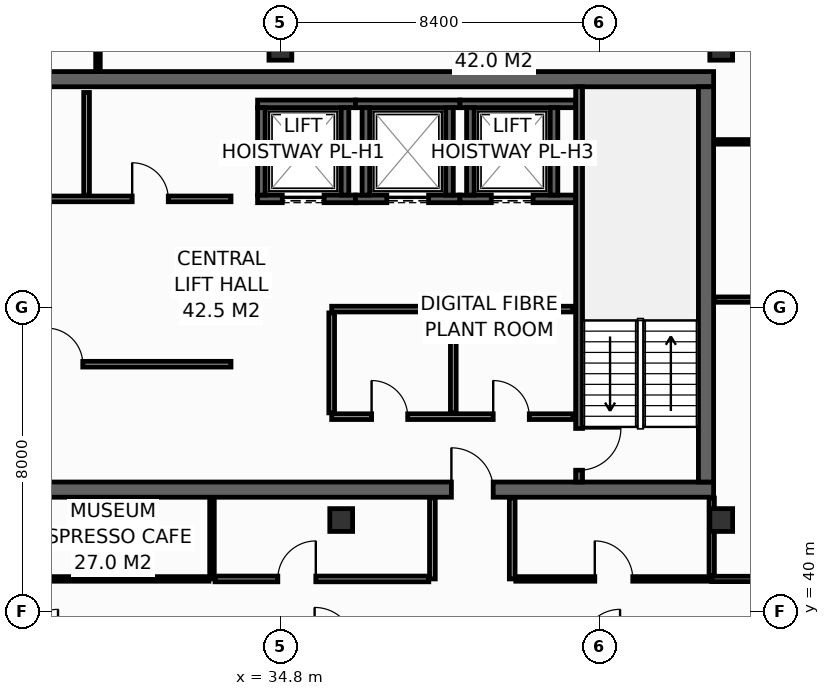
"""IFC4 building model, lengths in metres.
Left out: names, types, materials, properties, quantities, classifications, styles, units other than length and angle.
Written with IfcOpenShell. Run it as: python <this file> out.ifc"""

import sys

from ifc_helpers import new_model, si_unit, direction, frame, frame_2d, origin, origin_2d, place, context, subcontext, project, spatial, rectangle, hollow_rectangle, extrude, element, fill, save


model = new_model("IFC4")
c1 = context("Model", 3, precision=1e-05, world=origin(), true_north=direction((0.0, 1.0)))
c2 = subcontext(c1, "Body", "Model", "MODEL_VIEW")
j1 = project(units=[si_unit("LENGTHUNIT", "METRE"), si_unit("PLANEANGLEUNIT", "RADIAN")], contexts=[c1])
p1 = place(None, origin())
s1 = spatial("IfcSite", under=j1, at=p1, CompositionType="ELEMENT")
p2 = place(p1, origin())
s2 = spatial("IfcBuilding", under=s1, at=p2, CompositionType="ELEMENT")
p3 = place(p2, frame((0.0, 0.0, 261.0)))
s3 = spatial("IfcBuildingStorey", under=s2, at=p3, CompositionType="ELEMENT", Elevation=261.0)
p4 = place(p3, frame((13.7, 43.2, 0.0), z_axis=(0.0, 0.0, 1.0), x_axis=(1.0, 0.0, 0.0)))
e1 = element("IfcWall", 1, at=p4, inside=s3, PredefinedType="SHEAR", context=c2, shape_type="SweptSolid", body=[
    extrude(rectangle(XDim=32.5, YDim=0.4, at=frame_2d((16.25, 0.0))), origin(), (0.0, 0.0, 1.0), 3.55),
])
p5 = place(p4, frame((5.4, 0.0, 0.0)))
e2 = element("IfcOpeningElement", 2, at=p5, cuts=e1, PredefinedType="OPENING", context=c2, shape_type="SweptSolid", body=[
    extrude(rectangle(XDim=1.1, YDim=2.15, at=frame_2d((0.55, 1.075))), frame((0.0, 0.21, 0.0), z_axis=(0.0, -1.0, 0.0), x_axis=(1.0, 0.0, 0.0)), (0.0, 0.0, 1.0), 0.42),
])
p6 = place(p4, frame((25.6, 0.0, 0.0)))
e3 = element("IfcOpeningElement", 3, at=p6, cuts=e1, PredefinedType="OPENING", context=c2, shape_type="SweptSolid", body=[
    extrude(rectangle(XDim=1.1, YDim=2.15, at=frame_2d((0.55, 1.075))), frame((0.0, 0.21, 0.0), z_axis=(0.0, -1.0, 0.0), x_axis=(1.0, 0.0, 0.0)), (0.0, 0.0, 1.0), 0.42),
])
p7 = place(p3, frame((13.7, 54.0, 0.0), z_axis=(0.0, 0.0, 1.0), x_axis=(1.0, 0.0, 0.0)))
e4 = element("IfcWall", 4, at=p7, inside=s3, PredefinedType="SHEAR", context=c2, shape_type="SweptSolid", body=[
    extrude(rectangle(XDim=32.5, YDim=0.4, at=frame_2d((16.25, 0.0))), origin(), (0.0, 0.0, 1.0), 3.55),
])
p8 = place(p3, frame((46.0, 43.4, 0.0), z_axis=(0.0, 0.0, 1.0), x_axis=(0.0, 1.0, 0.0)))
e5 = element("IfcWall", 5, at=p8, inside=s3, PredefinedType="SHEAR", context=c2, shape_type="SweptSolid", body=[
    extrude(rectangle(XDim=10.4, YDim=0.4, at=frame_2d((5.2, 0.0))), origin(), (0.0, 0.0, 1.0), 3.55),
])
for number, where, z_axis, x_axis in (
    (6, (34.8, 54.8, 0.0), (0.0, 0.0, 1.0), (1.0, 0.0, 0.0)),
    (7, (46.4, 54.8, 0.0), (0.0, 0.0, 1.0), (1.0, 0.0, 0.0)),
    (8, (36.4, 42.4, 0.0), (0.0, 0.0, 1.0), (1.0, 0.0, 0.0)),
    (9, (46.4, 42.4, 0.0), (0.0, 0.0, 1.0), (1.0, 0.0, 0.0)),
):
    element("IfcColumn", number, at=place(p3, frame(where, z_axis=z_axis, x_axis=x_axis)), inside=s3, PredefinedType="COLUMN", context=c2, shape_type="SweptSolid", body=[
        extrude(hollow_rectangle(XDim=0.6, YDim=0.6, WallThickness=0.028, at=origin_2d()), origin(), (0.0, 0.0, 1.0), 3.8),
    ])
p9 = place(p3, frame((34.2, 50.85, 0.0), z_axis=(0.0, 0.0, 1.0), x_axis=(1.0, 0.0, 0.0)))
e10 = element("IfcWall", 10, at=p9, inside=s3, PredefinedType="SHEAR", context=c2, shape_type="SweptSolid", body=[
    extrude(rectangle(XDim=2.575, YDim=0.2, at=frame_2d((1.288, 0.0))), origin(), (0.0, 0.0, 1.0), 3.55),
])
p10 = place(p9, frame((0.65, 0.0, 0.0)))
e11 = element("IfcOpeningElement", 11, at=p10, cuts=e10, PredefinedType="OPENING", context=c2, shape_type="SweptSolid", body=[
    extrude(rectangle(XDim=1.1, YDim=2.2, at=frame_2d((0.55, 1.1))), frame((0.0, 0.11, 0.0), z_axis=(0.0, -1.0, 0.0), x_axis=(1.0, 0.0, 0.0)), (0.0, 0.0, 1.0), 0.22),
])
p11 = place(p3, frame((34.2, 53.35, 0.0), z_axis=(0.0, 0.0, 1.0), x_axis=(1.0, 0.0, 0.0)))
e12 = element("IfcWall", 12, at=p11, inside=s3, PredefinedType="SHEAR", context=c2, shape_type="SweptSolid", body=[
    extrude(rectangle(XDim=2.575, YDim=0.2, at=frame_2d((1.288, 0.0))), origin(), (0.0, 0.0, 1.0), 3.55),
])
for number, where, z_axis, x_axis in (
    (13, (34.3, 50.95, 0.0), (0.0, 0.0, 1.0), (0.0, 1.0, 0.0)),
    (14, (36.5, 50.95, 0.0), (0.0, 0.0, 1.0), (0.0, 1.0, 0.0)),
):
    element("IfcWall", number, at=place(p3, frame(where, z_axis=z_axis, x_axis=x_axis)), inside=s3, PredefinedType="SHEAR", context=c2, shape_type="SweptSolid", body=[
        extrude(rectangle(XDim=2.3, YDim=0.2, at=frame_2d((1.15, 0.0))), origin(), (0.0, 0.0, 1.0), 3.55),
    ])
p12 = place(p3, frame((36.775, 50.85, 0.0), z_axis=(0.0, 0.0, 1.0), x_axis=(1.0, 0.0, 0.0)))
e15 = element("IfcWall", 15, at=p12, inside=s3, PredefinedType="SHEAR", context=c2, shape_type="SweptSolid", body=[
    extrude(rectangle(XDim=2.75, YDim=0.2, at=frame_2d((1.375, 0.0))), origin(), (0.0, 0.0, 1.0), 3.55),
])
p13 = place(p12, frame((0.825, 0.0, 0.0)))
e16 = element("IfcOpeningElement", 16, at=p13, cuts=e15, PredefinedType="OPENING", context=c2, shape_type="SweptSolid", body=[
    extrude(rectangle(XDim=1.1, YDim=2.2, at=frame_2d((0.55, 1.1))), frame((0.0, 0.11, 0.0), z_axis=(0.0, -1.0, 0.0), x_axis=(1.0, 0.0, 0.0)), (0.0, 0.0, 1.0), 0.22),
])
p14 = place(p3, frame((36.775, 53.35, 0.0), z_axis=(0.0, 0.0, 1.0), x_axis=(1.0, 0.0, 0.0)))
e17 = element("IfcWall", 17, at=p14, inside=s3, PredefinedType="SHEAR", context=c2, shape_type="SweptSolid", body=[
    extrude(rectangle(XDim=2.75, YDim=0.2, at=frame_2d((1.375, 0.0))), origin(), (0.0, 0.0, 1.0), 3.55),
])
for number, where, z_axis, x_axis in (
    (18, (37.05, 50.95, 0.0), (0.0, 0.0, 1.0), (0.0, 1.0, 0.0)),
    (19, (39.25, 50.95, 0.0), (0.0, 0.0, 1.0), (0.0, 1.0, 0.0)),
):
    element("IfcWall", number, at=place(p3, frame(where, z_axis=z_axis, x_axis=x_axis)), inside=s3, PredefinedType="SHEAR", context=c2, shape_type="SweptSolid", body=[
        extrude(rectangle(XDim=2.3, YDim=0.2, at=frame_2d((1.15, 0.0))), origin(), (0.0, 0.0, 1.0), 3.55),
    ])
p15 = place(p3, frame((39.525, 50.85, 0.0), z_axis=(0.0, 0.0, 1.0), x_axis=(1.0, 0.0, 0.0)))
e20 = element("IfcWall", 20, at=p15, inside=s3, PredefinedType="SHEAR", context=c2, shape_type="SweptSolid", body=[
    extrude(rectangle(XDim=3.045, YDim=0.2, at=frame_2d((1.522, 0.0))), origin(), (0.0, 0.0, 1.0), 3.55),
])
p16 = place(p15, frame((0.825, 0.0, 0.0)))
e21 = element("IfcOpeningElement", 21, at=p16, cuts=e20, PredefinedType="OPENING", context=c2, shape_type="SweptSolid", body=[
    extrude(rectangle(XDim=1.1, YDim=2.2, at=frame_2d((0.55, 1.1))), frame((0.0, 0.11, 0.0), z_axis=(0.0, -1.0, 0.0), x_axis=(1.0, 0.0, 0.0)), (0.0, 0.0, 1.0), 0.22),
])
p17 = place(p3, frame((39.525, 53.35, 0.0), z_axis=(0.0, 0.0, 1.0), x_axis=(1.0, 0.0, 0.0)))
e22 = element("IfcWall", 22, at=p17, inside=s3, PredefinedType="SHEAR", context=c2, shape_type="SweptSolid", body=[
    extrude(rectangle(XDim=3.045, YDim=0.2, at=frame_2d((1.522, 0.0))), origin(), (0.0, 0.0, 1.0), 3.55),
])
for number, where, z_axis, x_axis in (
    (23, (39.8, 50.95, 0.0), (0.0, 0.0, 1.0), (0.0, 1.0, 0.0)),
    (24, (42.0, 50.95, 0.0), (0.0, 0.0, 1.0), (0.0, 1.0, 0.0)),
):
    element("IfcWall", number, at=place(p3, frame(where, z_axis=z_axis, x_axis=x_axis)), inside=s3, PredefinedType="SHEAR", context=c2, shape_type="SweptSolid", body=[
        extrude(rectangle(XDim=2.3, YDim=0.2, at=frame_2d((1.15, 0.0))), origin(), (0.0, 0.0, 1.0), 3.55),
    ])
p18 = place(p3, frame((42.66, 53.8, 0.0), z_axis=(0.0, 0.0, 1.0), x_axis=(0.0, -1.0, 0.0)))
e25 = element("IfcWall", 25, at=p18, inside=s3, PredefinedType="SHEAR", context=c2, shape_type="SweptSolid", body=[
    extrude(rectangle(XDim=10.4, YDim=0.18, at=frame_2d((5.2, 0.0))), origin(), (0.0, 0.0, 1.0), 3.55),
])
p19 = place(p18, frame((8.99, 0.0, 0.0)))
e26 = element("IfcOpeningElement", 26, at=p19, cuts=e25, PredefinedType="OPENING", context=c2, shape_type="SweptSolid", body=[
    extrude(rectangle(XDim=1.1, YDim=2.15, at=frame_2d((0.55, 1.075))), frame((0.0, 0.1, 0.0), z_axis=(0.0, -1.0, 0.0), x_axis=(1.0, 0.0, 0.0)), (0.0, 0.0, 1.0), 0.2),
])
p20 = place(p3, frame((36.15, 45.12, 0.0), z_axis=(0.0, 0.0, 1.0), x_axis=(1.0, 0.0, 0.0)))
e27 = element("IfcWall", 27, at=p20, inside=s3, PredefinedType="PARTITIONING", context=c2, shape_type="SweptSolid", body=[
    extrude(rectangle(XDim=6.35, YDim=0.15, at=frame_2d((3.175, 0.0))), origin(), (0.0, 0.0, 1.0), 3.55),
])
p21 = place(p20, frame((1.05, 0.0, 0.0)))
e28 = element("IfcOpeningElement", 28, at=p21, cuts=e27, PredefinedType="OPENING", context=c2, shape_type="SweptSolid", body=[
    extrude(rectangle(XDim=0.95, YDim=2.15, at=frame_2d((0.475, 1.075))), frame((0.0, 0.085, 0.0), z_axis=(0.0, -1.0, 0.0), x_axis=(1.0, 0.0, 0.0)), (0.0, 0.0, 1.0), 0.17),
])
p22 = place(p20, frame((4.25, 0.0, 0.0)))
e29 = element("IfcOpeningElement", 29, at=p22, cuts=e27, PredefinedType="OPENING", context=c2, shape_type="SweptSolid", body=[
    extrude(rectangle(XDim=0.95, YDim=2.15, at=frame_2d((0.475, 1.075))), frame((0.0, 0.085, 0.0), z_axis=(0.0, -1.0, 0.0), x_axis=(1.0, 0.0, 0.0)), (0.0, 0.0, 1.0), 0.17),
])
p23 = place(p3, frame((36.15, 47.95, 0.0), z_axis=(0.0, 0.0, 1.0), x_axis=(1.0, 0.0, 0.0)))
e30 = element("IfcWall", 30, at=p23, inside=s3, PredefinedType="PARTITIONING", context=c2, shape_type="SweptSolid", body=[
    extrude(rectangle(XDim=6.35, YDim=0.15, at=frame_2d((3.175, 0.0))), origin(), (0.0, 0.0, 1.0), 3.55),
])
for number, where, z_axis, x_axis in (
    (31, (36.15, 45.22, 0.0), (0.0, 0.0, 1.0), (0.0, 1.0, 0.0)),
    (32, (39.35, 45.22, 0.0), (0.0, 0.0, 1.0), (0.0, 1.0, 0.0)),
):
    element("IfcWall", number, at=place(p3, frame(where, z_axis=z_axis, x_axis=x_axis)), inside=s3, PredefinedType="PARTITIONING", context=c2, shape_type="SweptSolid", body=[
        extrude(rectangle(XDim=2.63, YDim=0.15, at=frame_2d((1.315, 0.0))), origin(), (0.0, 0.0, 1.0), 3.55),
    ])
p24 = place(p3, frame((25.85, 50.85, 0.0), z_axis=(0.0, 0.0, 1.0), x_axis=(1.0, 0.0, 0.0)))
e33 = element("IfcWall", 33, at=p24, inside=s3, PredefinedType="PARTITIONING", context=c2, shape_type="SweptSolid", body=[
    extrude(rectangle(XDim=7.65, YDim=0.15, at=frame_2d((3.825, 0.0))), origin(), (0.0, 0.0, 1.0), 3.55),
])
p25 = place(p24, frame((1.25, 0.0, 0.0)))
e34 = element("IfcOpeningElement", 34, at=p25, cuts=e33, PredefinedType="OPENING", context=c2, shape_type="SweptSolid", body=[
    extrude(rectangle(XDim=0.95, YDim=2.15, at=frame_2d((0.475, 1.075))), frame((0.0, 0.085, 0.0), z_axis=(0.0, -1.0, 0.0), x_axis=(1.0, 0.0, 0.0)), (0.0, 0.0, 1.0), 0.17),
])
p26 = place(p24, frame((5.05, 0.0, 0.0)))
e35 = element("IfcOpeningElement", 35, at=p26, cuts=e33, PredefinedType="OPENING", context=c2, shape_type="SweptSolid", body=[
    extrude(rectangle(XDim=0.95, YDim=2.15, at=frame_2d((0.475, 1.075))), frame((0.0, 0.085, 0.0), z_axis=(0.0, -1.0, 0.0), x_axis=(1.0, 0.0, 0.0)), (0.0, 0.0, 1.0), 0.17),
])
p27 = place(p3, frame((29.7, 50.95, 0.0), z_axis=(0.0, 0.0, 1.0), x_axis=(0.0, 1.0, 0.0)))
e36 = element("IfcWall", 36, at=p27, inside=s3, PredefinedType="PARTITIONING", context=c2, shape_type="SweptSolid", body=[
    extrude(rectangle(XDim=2.7, YDim=0.15, at=frame_2d((1.35, 0.0))), origin(), (0.0, 0.0, 1.0), 3.55),
])
p28 = place(p3, frame((25.85, 46.5, 0.0), z_axis=(0.0, 0.0, 1.0), x_axis=(1.0, 0.0, 0.0)))
e37 = element("IfcWall", 37, at=p28, inside=s3, PredefinedType="PARTITIONING", context=c2, shape_type="SweptSolid", body=[
    extrude(rectangle(XDim=7.65, YDim=0.15, at=frame_2d((3.825, 0.0))), origin(), (0.0, 0.0, 1.0), 3.55),
])
p29 = place(p28, frame((2.8, 0.0, 0.0)))
e38 = element("IfcOpeningElement", 38, at=p29, cuts=e37, PredefinedType="OPENING", context=c2, shape_type="SweptSolid", body=[
    extrude(rectangle(XDim=0.95, YDim=2.15, at=frame_2d((0.475, 1.075))), frame((0.0, 0.085, 0.0), z_axis=(0.0, -1.0, 0.0), x_axis=(1.0, 0.0, 0.0)), (0.0, 0.0, 1.0), 0.17),
])
p30 = place(p3, frame((46.15, 40.85, 0.0), z_axis=(0.0, 0.0, 1.0), x_axis=(1.0, 0.0, 0.0)))
e39 = element("IfcWall", 39, at=p30, inside=s3, PredefinedType="PARTITIONING", context=c2, shape_type="SweptSolid", body=[
    extrude(rectangle(XDim=4.05, YDim=0.14, at=frame_2d((2.025, 0.0))), origin(), (0.0, 0.0, 1.0), 3.55),
])
p31 = place(p3, frame((46.15, 40.94, 0.0), z_axis=(0.0, 0.0, 1.0), x_axis=(0.0, 1.0, 0.0)))
e40 = element("IfcWall", 40, at=p31, inside=s3, PredefinedType="PARTITIONING", context=c2, shape_type="SweptSolid", body=[
    extrude(rectangle(XDim=2.04, YDim=0.14, at=frame_2d((1.02, 0.0))), origin(), (0.0, 0.0, 1.0), 3.55),
])
p32 = place(p3, frame((46.22, 48.2, 0.0), z_axis=(0.0, 0.0, 1.0), x_axis=(1.0, 0.0, 0.0)))
e41 = element("IfcWall", 41, at=p32, inside=s3, PredefinedType="PARTITIONING", context=c2, shape_type="SweptSolid", body=[
    extrude(rectangle(XDim=3.98, YDim=0.14, at=frame_2d((1.99, 0.0))), origin(), (0.0, 0.0, 1.0), 3.55),
])
p33 = place(p3, frame((46.22, 52.35, 0.0), z_axis=(0.0, 0.0, 1.0), x_axis=(1.0, 0.0, 0.0)))
e42 = element("IfcWall", 42, at=p33, inside=s3, PredefinedType="PARTITIONING", context=c2, shape_type="SweptSolid", body=[
    extrude(rectangle(XDim=3.98, YDim=0.12, at=frame_2d((1.99, 0.0))), origin(), (0.0, 0.0, 1.0), 3.55),
])
p34 = place(p3, frame((30.0, 54.22, 0.0), z_axis=(0.0, 0.0, 1.0), x_axis=(0.0, 1.0, 0.0)))
e43 = element("IfcWall", 43, at=p34, inside=s3, PredefinedType="PARTITIONING", context=c2, shape_type="SweptSolid", body=[
    extrude(rectangle(XDim=1.775, YDim=0.12, at=frame_2d((0.888, 0.0))), origin(), (0.0, 0.0, 1.0), 2.935),
])
for number, where, z_axis, x_axis in (
    (44, (38.8, 40.85, 0.0), (0.0, 0.0, 1.0), (0.0, 1.0, 0.0)),
    (45, (40.9, 40.85, 0.0), (0.0, 0.0, 1.0), (0.0, 1.0, 0.0)),
):
    element("IfcWall", number, at=place(p3, frame(where, z_axis=z_axis, x_axis=x_axis)), inside=s3, PredefinedType="PARTITIONING", context=c2, shape_type="SweptSolid", body=[
        extrude(rectangle(XDim=2.13, YDim=0.15, at=frame_2d((1.065, 0.0))), origin(), (0.0, 0.0, 1.0), 3.55),
    ])
p35 = place(p3, frame((33.0, 40.85, 0.0), z_axis=(0.0, 0.0, 1.0), x_axis=(0.0, 1.0, 0.0)))
e46 = element("IfcWall", 46, at=p35, inside=s3, PredefinedType="PARTITIONING", context=c2, shape_type="SweptSolid", body=[
    extrude(rectangle(XDim=2.13, YDim=0.12, at=frame_2d((1.065, 0.0))), origin(), (0.0, 0.0, 1.0), 2.947),
])
p36 = place(p3, frame((20.795, 40.85, 0.0), z_axis=(0.0, 0.0, 1.0), x_axis=(1.0, 0.0, 0.0)))
e47 = element("IfcWall", 47, at=p36, inside=s3, PredefinedType="PARTITIONING", context=c2, shape_type="SweptSolid", body=[
    extrude(rectangle(XDim=12.125, YDim=0.12, at=frame_2d((6.062, 0.0))), origin(), (0.0, 0.0, 1.0), 2.947),
])
p37 = place(p36, frame((5.562, 0.0, 0.0)))
e48 = element("IfcOpeningElement", 48, at=p37, cuts=e47, PredefinedType="OPENING", context=c2, shape_type="SweptSolid", body=[
    extrude(rectangle(XDim=1.0, YDim=2.15, at=frame_2d((0.5, 1.075))), frame((0.0, 0.07, 0.0), z_axis=(0.0, -1.0, 0.0), x_axis=(1.0, 0.0, 0.0)), (0.0, 0.0, 1.0), 0.14),
])
p38 = place(p3, frame((33.08, 40.85, 0.0), z_axis=(0.0, 0.0, 1.0), x_axis=(1.0, 0.0, 0.0)))
e49 = element("IfcWall", 49, at=p38, inside=s3, PredefinedType="PARTITIONING", context=c2, shape_type="SweptSolid", body=[
    extrude(rectangle(XDim=5.625, YDim=0.15, at=frame_2d((2.812, 0.0))), origin(), (0.0, 0.0, 1.0), 2.947),
])
p39 = place(p38, frame((1.652, 0.0, 0.0)))
e50 = element("IfcOpeningElement", 50, at=p39, cuts=e49, PredefinedType="OPENING", context=c2, shape_type="SweptSolid", body=[
    extrude(rectangle(XDim=1.0, YDim=2.15, at=frame_2d((0.5, 1.075))), frame((0.0, 0.085, 0.0), z_axis=(0.0, -1.0, 0.0), x_axis=(1.0, 0.0, 0.0)), (0.0, 0.0, 1.0), 0.17),
])
p40 = place(p3, frame((40.995, 40.85, 0.0), z_axis=(0.0, 0.0, 1.0), x_axis=(1.0, 0.0, 0.0)))
e51 = element("IfcWall", 51, at=p40, inside=s3, PredefinedType="PARTITIONING", context=c2, shape_type="SweptSolid", body=[
    extrude(rectangle(XDim=5.155, YDim=0.12, at=frame_2d((2.577, 0.0))), origin(), (0.0, 0.0, 1.0), 3.55),
])
p41 = place(p40, frame((2.078, 0.0, 0.0)))
e52 = element("IfcOpeningElement", 52, at=p41, cuts=e51, PredefinedType="OPENING", context=c2, shape_type="SweptSolid", body=[
    extrude(rectangle(XDim=1.0, YDim=2.15, at=frame_2d((0.5, 1.075))), frame((0.0, 0.07, 0.0), z_axis=(0.0, -1.0, 0.0), x_axis=(1.0, 0.0, 0.0)), (0.0, 0.0, 1.0), 0.14),
])
p42 = place(p10, origin())
e53 = element("IfcDoor", 53, at=p42, inside=s3, OperationType="SLIDING_TO_LEFT", PredefinedType="DOOR", context=c2, shape_type="SweptSolid", body=[
    extrude(rectangle(XDim=1.1, YDim=2.2, at=frame_2d((0.55, 1.1))), frame((0.0, 0.025, 0.0), z_axis=(0.0, -1.0, 0.0), x_axis=(1.0, 0.0, 0.0)), (0.0, 0.0, 1.0), 0.05),
])
fill(e11, e53)
p43 = place(p13, origin())
e54 = element("IfcDoor", 54, at=p43, inside=s3, OperationType="SLIDING_TO_LEFT", PredefinedType="DOOR", context=c2, shape_type="SweptSolid", body=[
    extrude(rectangle(XDim=1.1, YDim=2.2, at=frame_2d((0.55, 1.1))), frame((0.0, 0.025, 0.0), z_axis=(0.0, -1.0, 0.0), x_axis=(1.0, 0.0, 0.0)), (0.0, 0.0, 1.0), 0.05),
])
fill(e16, e54)
p44 = place(p16, origin())
e55 = element("IfcDoor", 55, at=p44, inside=s3, OperationType="SLIDING_TO_LEFT", PredefinedType="DOOR", context=c2, shape_type="SweptSolid", body=[
    extrude(rectangle(XDim=1.1, YDim=2.2, at=frame_2d((0.55, 1.1))), frame((0.0, 0.025, 0.0), z_axis=(0.0, -1.0, 0.0), x_axis=(1.0, 0.0, 0.0)), (0.0, 0.0, 1.0), 0.05),
])
fill(e21, e55)
p45 = place(p19, origin())
e56 = element("IfcDoor", 56, at=p45, inside=s3, OperationType="SINGLE_SWING_LEFT", PredefinedType="DOOR", context=c2, shape_type="SweptSolid", body=[
    extrude(rectangle(XDim=1.1, YDim=2.15, at=frame_2d((0.55, 1.075))), frame((0.0, 0.025, 0.0), z_axis=(0.0, -1.0, 0.0), x_axis=(1.0, 0.0, 0.0)), (0.0, 0.0, 1.0), 0.05),
])
fill(e26, e56)
p46 = place(p6, origin())
e57 = element("IfcDoor", 57, at=p46, inside=s3, OperationType="SINGLE_SWING_LEFT", PredefinedType="DOOR", context=c2, shape_type="SweptSolid", body=[
    extrude(rectangle(XDim=1.1, YDim=2.15, at=frame_2d((0.55, 1.075))), frame((0.0, 0.025, 0.0), z_axis=(0.0, -1.0, 0.0), x_axis=(1.0, 0.0, 0.0)), (0.0, 0.0, 1.0), 0.05),
])
fill(e3, e57)
p47 = place(p21, origin())
e58 = element("IfcDoor", 58, at=p47, inside=s3, OperationType="SINGLE_SWING_LEFT", PredefinedType="DOOR", context=c2, shape_type="SweptSolid", body=[
    extrude(rectangle(XDim=0.95, YDim=2.15, at=frame_2d((0.475, 1.075))), frame((0.0, 0.025, 0.0), z_axis=(0.0, -1.0, 0.0), x_axis=(1.0, 0.0, 0.0)), (0.0, 0.0, 1.0), 0.05),
])
fill(e28, e58)
p48 = place(p22, origin())
e59 = element("IfcDoor", 59, at=p48, inside=s3, OperationType="SINGLE_SWING_LEFT", PredefinedType="DOOR", context=c2, shape_type="SweptSolid", body=[
    extrude(rectangle(XDim=0.95, YDim=2.15, at=frame_2d((0.475, 1.075))), frame((0.0, 0.025, 0.0), z_axis=(0.0, -1.0, 0.0), x_axis=(1.0, 0.0, 0.0)), (0.0, 0.0, 1.0), 0.05),
])
fill(e29, e59)
p49 = place(p26, origin())
e60 = element("IfcDoor", 60, at=p49, inside=s3, OperationType="SINGLE_SWING_LEFT", PredefinedType="DOOR", context=c2, shape_type="SweptSolid", body=[
    extrude(rectangle(XDim=0.95, YDim=2.15, at=frame_2d((0.475, 1.075))), frame((0.0, 0.025, 0.0), z_axis=(0.0, -1.0, 0.0), x_axis=(1.0, 0.0, 0.0)), (0.0, 0.0, 1.0), 0.05),
])
fill(e35, e60)
p50 = place(p29, origin())
e61 = element("IfcDoor", 61, at=p50, inside=s3, OperationType="SINGLE_SWING_LEFT", PredefinedType="DOOR", context=c2, shape_type="SweptSolid", body=[
    extrude(rectangle(XDim=0.95, YDim=2.15, at=frame_2d((0.475, 1.075))), frame((0.0, 0.025, 0.0), z_axis=(0.0, -1.0, 0.0), x_axis=(1.0, 0.0, 0.0)), (0.0, 0.0, 1.0), 0.05),
])
fill(e38, e61)
p51 = place(p39, origin())
e62 = element("IfcDoor", 62, at=p51, inside=s3, OperationType="SINGLE_SWING_RIGHT", PredefinedType="DOOR", context=c2, shape_type="SweptSolid", body=[
    extrude(rectangle(XDim=1.0, YDim=2.15, at=frame_2d((0.5, 1.075))), frame((0.0, 0.025, 0.0), z_axis=(0.0, -1.0, 0.0), x_axis=(1.0, 0.0, 0.0)), (0.0, 0.0, 1.0), 0.05),
])
fill(e50, e62)
p52 = place(p41, origin())
e63 = element("IfcDoor", 63, at=p52, inside=s3, OperationType="SINGLE_SWING_LEFT", PredefinedType="DOOR", context=c2, shape_type="SweptSolid", body=[
    extrude(rectangle(XDim=1.0, YDim=2.15, at=frame_2d((0.5, 1.075))), frame((0.0, 0.025, 0.0), z_axis=(0.0, -1.0, 0.0), x_axis=(1.0, 0.0, 0.0)), (0.0, 0.0, 1.0), 0.05),
])
fill(e52, e63)
save(model, sys.argv[1])
